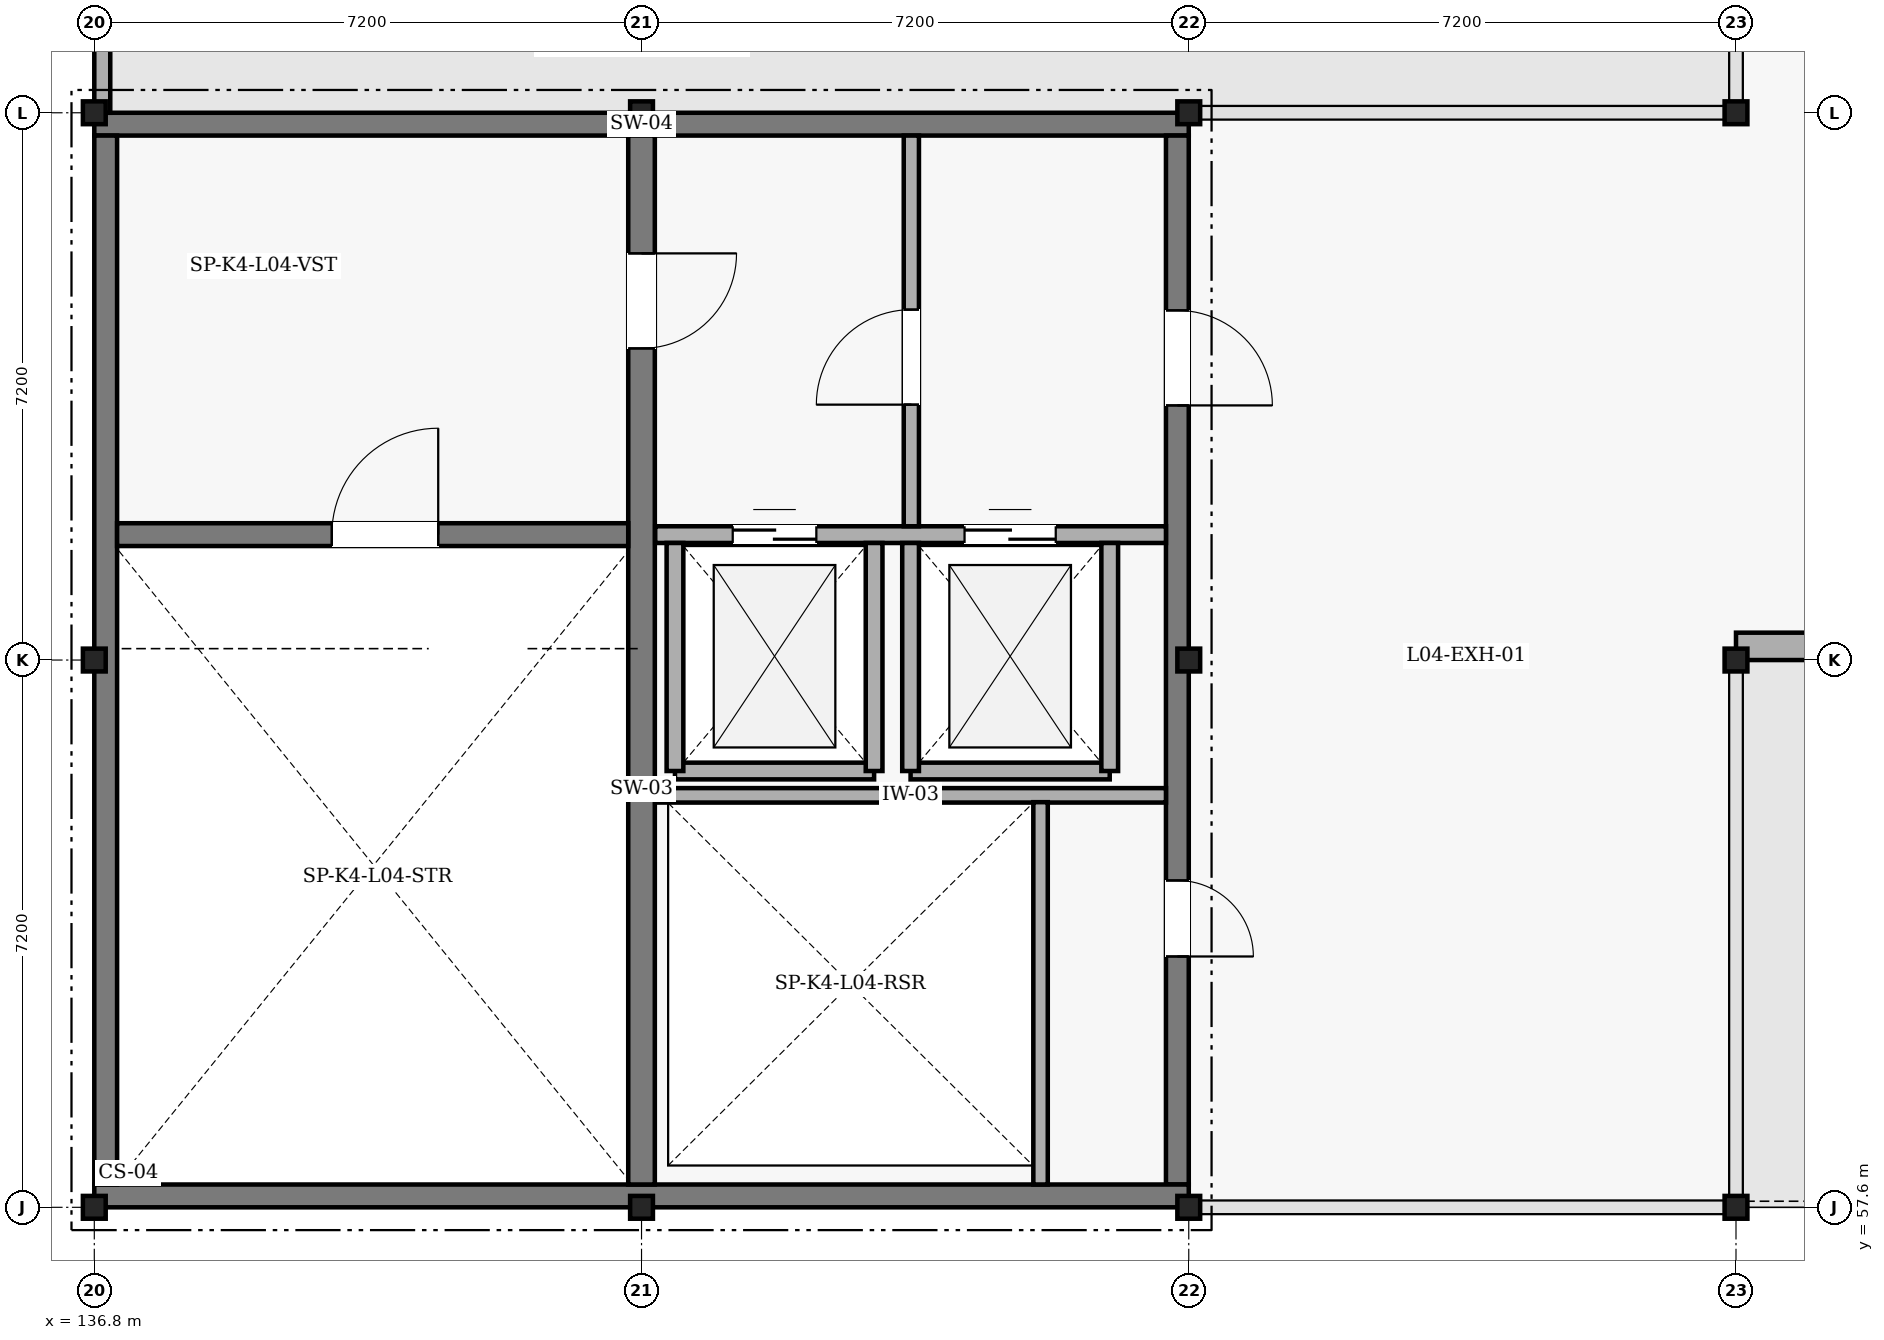
"""IFC4 building model, lengths in metres.
Left out: names, types, materials, properties, quantities, classifications, styles, units other than length and angle.
Written with IfcOpenShell. Run it as: python <this file> out.ifc"""

import sys

from ifc_helpers import new_model, si_unit, direction, frame, frame_2d, origin, origin_2d, place, context, subcontext, project, spatial, rectangle, i_section, extrude, element, fill, save


model = new_model("IFC4")
c1 = context("Model", 3, precision=1e-05, world=origin(), true_north=direction((0.0, 1.0)))
c2 = subcontext(c1, "Body", "Model", "MODEL_VIEW")
j1 = project(units=[si_unit("LENGTHUNIT", "METRE"), si_unit("PLANEANGLEUNIT", "RADIAN")], contexts=[c1])
p1 = place(None, origin())
s1 = spatial("IfcSite", under=j1, at=p1, CompositionType="ELEMENT")
p2 = place(p1, origin())
s2 = spatial("IfcBuilding", under=s1, at=p2, CompositionType="ELEMENT")
p3 = place(p2, frame((0.0, 0.0, 18.0)))
s3 = spatial("IfcBuildingStorey", under=s2, at=p3, CompositionType="ELEMENT", Elevation=18.0)
p4 = place(p3, frame((136.8, 71.85, 0.0), z_axis=(0.0, 0.0, 1.0), x_axis=(1.0, 0.0, 0.0)))
e1 = element("IfcWall", 1, at=p4, inside=s3, PredefinedType="SHEAR", context=c2, shape_type="SweptSolid", body=[
    extrude(rectangle(XDim=14.4, YDim=0.3, at=frame_2d((7.2, 0.0))), origin(), (0.0, 0.0, 1.0), 3.6),
])
p5 = place(p3, frame((151.05, 71.7, 0.0), z_axis=(0.0, 0.0, 1.0), x_axis=(0.0, -1.0, 0.0)))
e2 = element("IfcWall", 2, at=p5, inside=s3, PredefinedType="SHEAR", context=c2, shape_type="SweptSolid", body=[
    extrude(rectangle(XDim=13.8, YDim=0.3, at=frame_2d((6.9, 0.0))), origin(), (0.0, 0.0, 1.0), 3.6),
])
p6 = place(p5, frame((9.8, 0.0, 0.0)))
e3 = element("IfcOpeningElement", 3, at=p6, cuts=e2, PredefinedType="OPENING", context=c2, shape_type="SweptSolid", body=[
    extrude(rectangle(XDim=1.0, YDim=2.15, at=frame_2d((0.5, 1.075))), frame((0.0, 0.16, 0.0), z_axis=(0.0, -1.0, 0.0), x_axis=(1.0, 0.0, 0.0)), (0.0, 0.0, 1.0), 0.32),
])
p7 = place(p5, frame((2.3, 0.0, 0.0)))
e4 = element("IfcOpeningElement", 4, at=p7, cuts=e2, PredefinedType="OPENING", context=c2, shape_type="SweptSolid", body=[
    extrude(rectangle(XDim=1.25, YDim=2.2, at=frame_2d((0.625, 1.1))), frame((0.0, 0.16, 0.0), z_axis=(0.0, -1.0, 0.0), x_axis=(1.0, 0.0, 0.0)), (0.0, 0.0, 1.0), 0.32),
])
p8 = place(p3, frame((151.2, 57.75, 0.0), z_axis=(0.0, 0.0, 1.0), x_axis=(-1.0, 0.0, 0.0)))
e5 = element("IfcWall", 5, at=p8, inside=s3, PredefinedType="SHEAR", context=c2, shape_type="SweptSolid", body=[
    extrude(rectangle(XDim=14.4, YDim=0.3, at=frame_2d((7.2, 0.0))), origin(), (0.0, 0.0, 1.0), 3.6),
])
p9 = place(p3, frame((136.95, 57.9, 0.0), z_axis=(0.0, 0.0, 1.0), x_axis=(0.0, 1.0, 0.0)))
e6 = element("IfcWall", 6, at=p9, inside=s3, PredefinedType="SHEAR", context=c2, shape_type="SweptSolid", body=[
    extrude(rectangle(XDim=13.8, YDim=0.3, at=frame_2d((6.9, 0.0))), origin(), (0.0, 0.0, 1.0), 3.6),
])
p10 = place(p3, frame((144.0, 71.7, 0.0), z_axis=(0.0, 0.0, 1.0), x_axis=(0.0, -1.0, 0.0)))
e7 = element("IfcWall", 7, at=p10, inside=s3, PredefinedType="SHEAR", context=c2, shape_type="SweptSolid", body=[
    extrude(rectangle(XDim=13.8, YDim=0.35, at=frame_2d((6.9, 0.0))), origin(), (0.0, 0.0, 1.0), 3.6),
])
p11 = place(p10, frame((1.55, 0.0, 0.0)))
e8 = element("IfcOpeningElement", 8, at=p11, cuts=e7, PredefinedType="OPENING", context=c2, shape_type="SweptSolid", body=[
    extrude(rectangle(XDim=1.25, YDim=2.2, at=frame_2d((0.625, 1.1))), frame((0.0, 0.185, 0.0), z_axis=(0.0, -1.0, 0.0), x_axis=(1.0, 0.0, 0.0)), (0.0, 0.0, 1.0), 0.37),
])
p12 = place(p3, frame((137.1, 66.45, 0.0), z_axis=(0.0, 0.0, 1.0), x_axis=(1.0, 0.0, 0.0)))
e9 = element("IfcWall", 9, at=p12, inside=s3, PredefinedType="SHEAR", context=c2, shape_type="SweptSolid", body=[
    extrude(rectangle(XDim=6.725, YDim=0.3, at=frame_2d((3.362, 0.0))), origin(), (0.0, 0.0, 1.0), 3.6),
])
p13 = place(p12, frame((2.825, 0.0, 0.0)))
e10 = element("IfcOpeningElement", 10, at=p13, cuts=e9, PredefinedType="OPENING", context=c2, shape_type="SweptSolid", body=[
    extrude(rectangle(XDim=1.4, YDim=2.2, at=frame_2d((0.7, 1.1))), frame((0.0, 0.16, 0.0), z_axis=(0.0, -1.0, 0.0), x_axis=(1.0, 0.0, 0.0)), (0.0, 0.0, 1.0), 0.32),
])
for number, where, z_axis, x_axis in (
    (11, (136.8, 57.6, 0.0), (0.0, 0.0, 1.0), (1.0, 0.0, 0.0)),
    (12, (136.8, 64.8, 0.0), (0.0, 0.0, 1.0), (1.0, 0.0, 0.0)),
    (13, (136.8, 72.0, 0.0), (0.0, 0.0, 1.0), (1.0, 0.0, 0.0)),
    (14, (144.0, 57.6, 0.0), (0.0, 0.0, 1.0), (1.0, 0.0, 0.0)),
    (15, (144.0, 72.0, 0.0), (0.0, 0.0, 1.0), (1.0, 0.0, 0.0)),
    (16, (151.2, 57.6, 0.0), (0.0, 0.0, 1.0), (1.0, 0.0, 0.0)),
    (17, (151.2, 64.8, 0.0), (0.0, 0.0, 1.0), (1.0, 0.0, 0.0)),
    (18, (151.2, 72.0, 0.0), (0.0, 0.0, 1.0), (1.0, 0.0, 0.0)),
    (19, (158.4, 57.6, 0.0), (0.0, 0.0, 1.0), (1.0, 0.0, 0.0)),
    (20, (158.4, 64.8, 0.0), (0.0, 0.0, 1.0), (1.0, 0.0, 0.0)),
    (21, (158.4, 72.0, 0.0), (0.0, 0.0, 1.0), (1.0, 0.0, 0.0)),
):
    element("IfcColumn", number, at=place(p3, frame(where, z_axis=z_axis, x_axis=x_axis)), inside=s3, PredefinedType="COLUMN", context=c2, shape_type="SweptSolid", body=[
        extrude(i_section(OverallWidth=0.3, OverallDepth=0.3, WebThickness=0.011, FlangeThickness=0.019, FilletRadius=0.027, at=origin_2d()), origin(), (0.0, 0.0, 1.0), 3.38),
    ])
p14 = place(p3, frame((165.643, 64.98, 0.0), z_axis=(0.0, 0.0, 1.0), x_axis=(-1.0, 0.0, 0.0)))
e22 = element("IfcWall", 22, at=p14, inside=s3, PredefinedType="SOLIDWALL", context=c2, shape_type="SweptSolid", body=[
    extrude(rectangle(XDim=7.243, YDim=0.36, at=frame_2d((3.621, 0.0))), origin(), (0.0, 0.0, 1.0), 2.93),
])
p15 = place(p14, frame((3.117, 0.0, 0.0)))
e23 = element("IfcOpeningElement", 23, at=p15, cuts=e22, PredefinedType="OPENING", context=c2, shape_type="SweptSolid", body=[
    extrude(rectangle(XDim=1.05, YDim=2.2, at=frame_2d((0.525, 1.1))), frame((0.0, 0.19, 0.0), z_axis=(0.0, -1.0, 0.0), x_axis=(1.0, 0.0, 0.0)), (0.0, 0.0, 1.0), 0.38),
])
p16 = place(p3, frame((136.905, 86.4, 0.0), z_axis=(0.0, 0.0, 1.0), x_axis=(0.0, -1.0, 0.0)))
e24 = element("IfcWall", 24, at=p16, inside=s3, PredefinedType="PARAPET", context=c2, shape_type="SweptSolid", body=[
    extrude(rectangle(XDim=14.4, YDim=0.21, at=frame_2d((7.2, 0.0))), origin(), (0.0, 0.0, 1.0), 0.55),
])
p17 = place(p3, frame((144.18, 63.02, 0.0), z_axis=(0.0, 0.0, 1.0), x_axis=(1.0, 0.0, 0.0)))
e25 = element("IfcWall", 25, at=p17, inside=s3, PredefinedType="PARTITIONING", context=c2, shape_type="SweptSolid", body=[
    extrude(rectangle(XDim=6.72, YDim=0.19, at=frame_2d((3.36, 0.0))), origin(), (0.0, 0.0, 1.0), 3.25),
])
p18 = place(p3, frame((149.25, 57.9, 0.0), z_axis=(0.0, 0.0, 1.0), x_axis=(0.0, 1.0, 0.0)))
e26 = element("IfcWall", 26, at=p18, inside=s3, PredefinedType="PARTITIONING", context=c2, shape_type="SweptSolid", body=[
    extrude(rectangle(XDim=5.03, YDim=0.19, at=frame_2d((2.515, 0.0))), origin(), (0.0, 0.0, 1.0), 3.25),
])
p19 = place(p3, frame((144.18, 66.45, 0.0), z_axis=(0.0, 0.0, 1.0), x_axis=(1.0, 0.0, 0.0)))
e27 = element("IfcWall", 27, at=p19, inside=s3, PredefinedType="PARTITIONING", context=c2, shape_type="SweptSolid", body=[
    extrude(rectangle(XDim=6.72, YDim=0.22, at=frame_2d((3.36, 0.0))), origin(), (0.0, 0.0, 1.0), 3.25),
])
p20 = place(p19, frame((1.02, 0.0, 0.0)))
e28 = element("IfcOpeningElement", 28, at=p20, cuts=e27, PredefinedType="OPENING", context=c2, shape_type="SweptSolid", body=[
    extrude(rectangle(XDim=1.1, YDim=2.15, at=frame_2d((0.55, 1.075))), frame((0.0, 0.12, 0.0), z_axis=(0.0, -1.0, 0.0), x_axis=(1.0, 0.0, 0.0)), (0.0, 0.0, 1.0), 0.24),
])
p21 = place(p19, frame((4.07, 0.0, 0.0)))
e29 = element("IfcOpeningElement", 29, at=p21, cuts=e27, PredefinedType="OPENING", context=c2, shape_type="SweptSolid", body=[
    extrude(rectangle(XDim=1.2, YDim=2.15, at=frame_2d((0.6, 1.075))), frame((0.0, 0.12, 0.0), z_axis=(0.0, -1.0, 0.0), x_axis=(1.0, 0.0, 0.0)), (0.0, 0.0, 1.0), 0.24),
])
p22 = place(p3, frame((144.44, 63.34, 0.0), z_axis=(0.0, 0.0, 1.0), x_axis=(1.0, 0.0, 0.0)))
e30 = element("IfcWall", 30, at=p22, inside=s3, PredefinedType="PARTITIONING", context=c2, shape_type="SweptSolid", body=[
    extrude(rectangle(XDim=2.62, YDim=0.22, at=frame_2d((1.31, 0.0))), origin(), (0.0, 0.0, 1.0), 3.25),
])
for number, where, z_axis, x_axis in (
    (31, (144.44, 63.34, 0.0), (0.0, 0.0, 1.0), (0.0, 1.0, 0.0)),
    (32, (147.06, 63.34, 0.0), (0.0, 0.0, 1.0), (0.0, 1.0, 0.0)),
):
    element("IfcWall", number, at=place(p3, frame(where, z_axis=z_axis, x_axis=x_axis)), inside=s3, PredefinedType="PARTITIONING", context=c2, shape_type="SweptSolid", body=[
        extrude(rectangle(XDim=3.0, YDim=0.22, at=frame_2d((1.5, 0.0))), origin(), (0.0, 0.0, 1.0), 3.25),
    ])
p23 = place(p3, frame((147.54, 63.34, 0.0), z_axis=(0.0, 0.0, 1.0), x_axis=(1.0, 0.0, 0.0)))
e33 = element("IfcWall", 33, at=p23, inside=s3, PredefinedType="PARTITIONING", context=c2, shape_type="SweptSolid", body=[
    extrude(rectangle(XDim=2.62, YDim=0.22, at=frame_2d((1.31, 0.0))), origin(), (0.0, 0.0, 1.0), 3.25),
])
for number, where, z_axis, x_axis in (
    (34, (147.54, 63.34, 0.0), (0.0, 0.0, 1.0), (0.0, 1.0, 0.0)),
    (35, (150.16, 63.34, 0.0), (0.0, 0.0, 1.0), (0.0, 1.0, 0.0)),
):
    element("IfcWall", number, at=place(p3, frame(where, z_axis=z_axis, x_axis=x_axis)), inside=s3, PredefinedType="PARTITIONING", context=c2, shape_type="SweptSolid", body=[
        extrude(rectangle(XDim=3.0, YDim=0.22, at=frame_2d((1.5, 0.0))), origin(), (0.0, 0.0, 1.0), 3.25),
    ])
p24 = place(p3, frame((147.55, 66.56, 0.0), z_axis=(0.0, 0.0, 1.0), x_axis=(0.0, 1.0, 0.0)))
e36 = element("IfcWall", 36, at=p24, inside=s3, PredefinedType="PARTITIONING", context=c2, shape_type="SweptSolid", body=[
    extrude(rectangle(XDim=5.14, YDim=0.2, at=frame_2d((2.57, 0.0))), origin(), (0.0, 0.0, 1.0), 3.25),
])
p25 = place(p24, frame((1.6, 0.0, 0.0)))
e37 = element("IfcOpeningElement", 37, at=p25, cuts=e36, PredefinedType="OPENING", context=c2, shape_type="SweptSolid", body=[
    extrude(rectangle(XDim=1.25, YDim=2.2, at=frame_2d((0.625, 1.1))), frame((0.0, 0.11, 0.0), z_axis=(0.0, -1.0, 0.0), x_axis=(1.0, 0.0, 0.0)), (0.0, 0.0, 1.0), 0.22),
])
p26 = place(p13, origin())
e38 = element("IfcDoor", 38, at=p26, inside=s3, OperationType="SINGLE_SWING_RIGHT", PredefinedType="DOOR", context=c2, shape_type="SweptSolid", body=[
    extrude(rectangle(XDim=1.4, YDim=2.2, at=frame_2d((0.7, 1.1))), frame((0.0, 0.025, 0.0), z_axis=(0.0, -1.0, 0.0), x_axis=(1.0, 0.0, 0.0)), (0.0, 0.0, 1.0), 0.05),
])
fill(e10, e38)
p27 = place(p11, origin())
e39 = element("IfcDoor", 39, at=p27, inside=s3, OperationType="SINGLE_SWING_LEFT", PredefinedType="DOOR", context=c2, shape_type="SweptSolid", body=[
    extrude(rectangle(XDim=1.25, YDim=2.2, at=frame_2d((0.625, 1.1))), frame((0.0, 0.025, 0.0), z_axis=(0.0, -1.0, 0.0), x_axis=(1.0, 0.0, 0.0)), (0.0, 0.0, 1.0), 0.05),
])
fill(e8, e39)
p28 = place(p6, origin())
e40 = element("IfcDoor", 40, at=p28, inside=s3, OperationType="SINGLE_SWING_RIGHT", PredefinedType="DOOR", context=c2, shape_type="SweptSolid", body=[
    extrude(rectangle(XDim=1.0, YDim=2.15, at=frame_2d((0.5, 1.075))), frame((0.0, 0.025, 0.0), z_axis=(0.0, -1.0, 0.0), x_axis=(1.0, 0.0, 0.0)), (0.0, 0.0, 1.0), 0.05),
])
fill(e3, e40)
p29 = place(p20, origin())
e41 = element("IfcDoor", 41, at=p29, inside=s3, OperationType="DOUBLE_DOOR_SLIDING", PredefinedType="DOOR", context=c2, shape_type="SweptSolid", body=[
    extrude(rectangle(XDim=1.1, YDim=2.15, at=frame_2d((0.55, 1.075))), frame((0.0, 0.025, 0.0), z_axis=(0.0, -1.0, 0.0), x_axis=(1.0, 0.0, 0.0)), (0.0, 0.0, 1.0), 0.05),
])
fill(e28, e41)
p30 = place(p21, origin())
e42 = element("IfcDoor", 42, at=p30, inside=s3, OperationType="DOUBLE_DOOR_SLIDING", PredefinedType="DOOR", context=c2, shape_type="SweptSolid", body=[
    extrude(rectangle(XDim=1.2, YDim=2.15, at=frame_2d((0.6, 1.075))), frame((0.0, 0.025, 0.0), z_axis=(0.0, -1.0, 0.0), x_axis=(1.0, 0.0, 0.0)), (0.0, 0.0, 1.0), 0.05),
])
fill(e29, e42)
p31 = place(p25, origin())
e43 = element("IfcDoor", 43, at=p31, inside=s3, OperationType="SINGLE_SWING_LEFT", PredefinedType="DOOR", context=c2, shape_type="SweptSolid", body=[
    extrude(rectangle(XDim=1.25, YDim=2.2, at=frame_2d((0.625, 1.1))), frame((0.0, 0.025, 0.0), z_axis=(0.0, -1.0, 0.0), x_axis=(1.0, 0.0, 0.0)), (0.0, 0.0, 1.0), 0.05),
])
fill(e37, e43)
p32 = place(p7, origin())
e44 = element("IfcDoor", 44, at=p32, inside=s3, OperationType="SINGLE_SWING_RIGHT", PredefinedType="DOOR", context=c2, shape_type="SweptSolid", body=[
    extrude(rectangle(XDim=1.25, YDim=2.2, at=frame_2d((0.625, 1.1))), frame((0.0, 0.025, 0.0), z_axis=(0.0, -1.0, 0.0), x_axis=(1.0, 0.0, 0.0)), (0.0, 0.0, 1.0), 0.05),
])
fill(e4, e44)
save(model, sys.argv[1])
